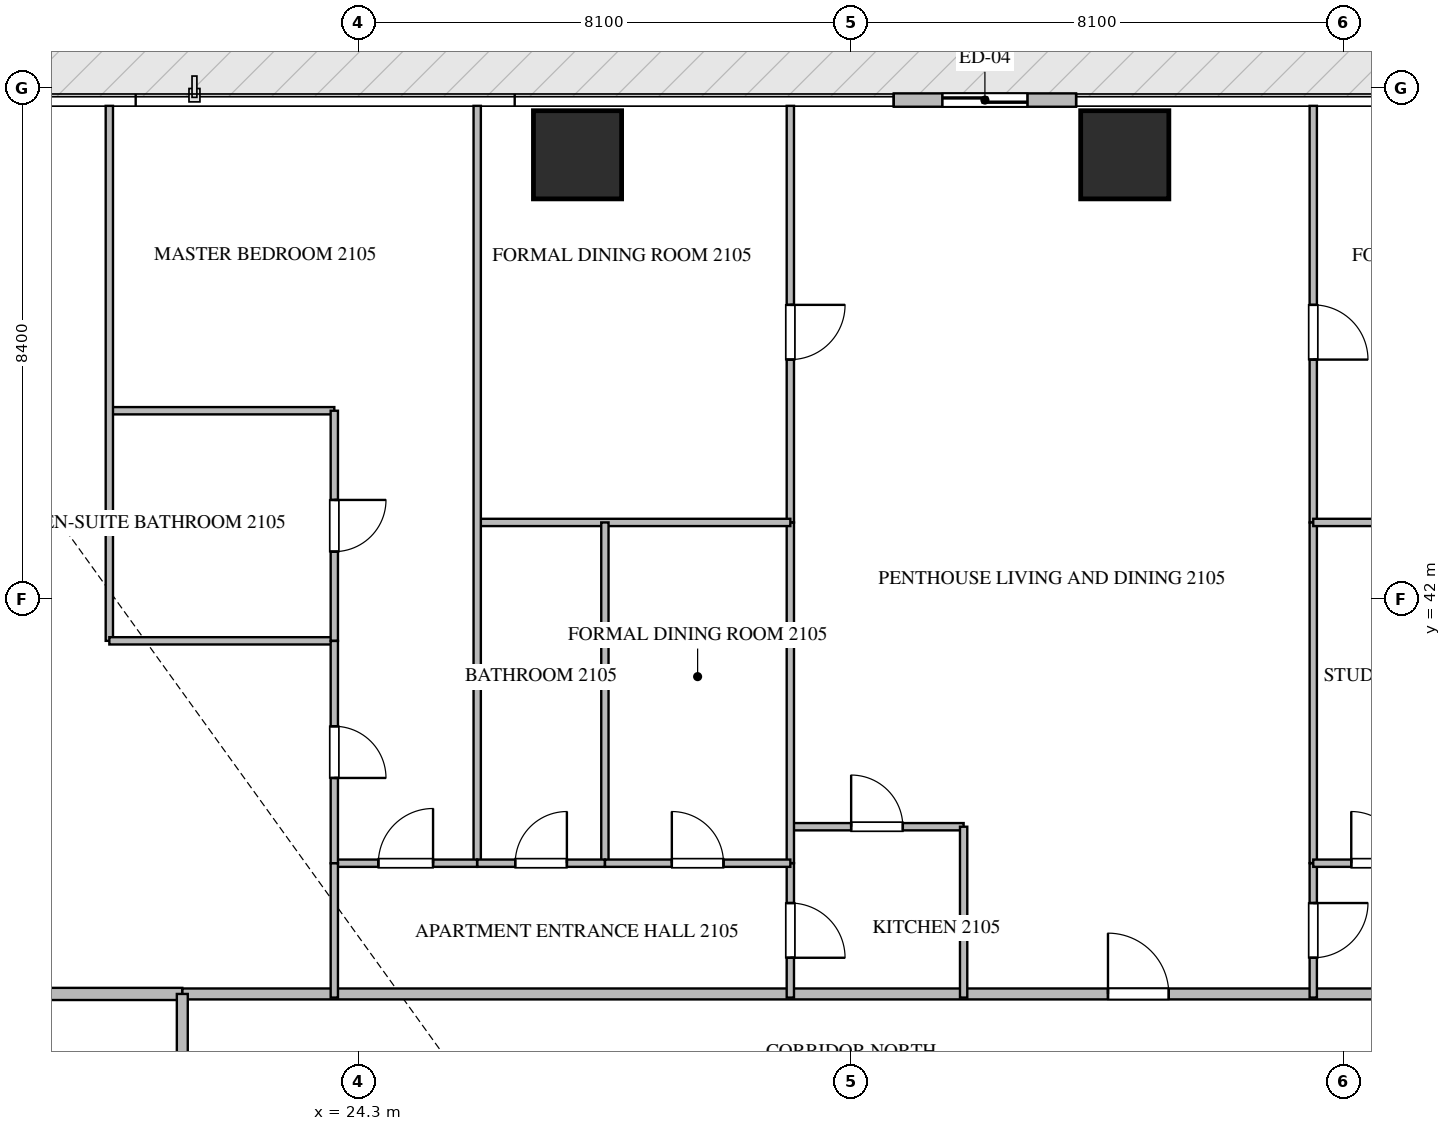
"""IFC4 building model, lengths in metres.
Left out: names, types, materials, properties, quantities, classifications, styles, units other than length and angle.
Written with IfcOpenShell. Run it as: python <this file> out.ifc"""

import sys

from ifc_helpers import new_model, si_unit, direction, frame, frame_2d, origin, origin_2d, place, context, subcontext, project, spatial, rectangle, extrude, source, transform, mapped, element, fill, save


model = new_model("IFC4")
c1 = context("Model", 3, precision=1e-05, world=origin(), true_north=direction((0.0, 1.0)))
c2 = subcontext(c1, "Body", "Model", "MODEL_VIEW")
j1 = project(units=[si_unit("LENGTHUNIT", "METRE"), si_unit("PLANEANGLEUNIT", "RADIAN")], contexts=[c1])
p1 = place(None, origin())
s1 = spatial("IfcSite", under=j1, at=p1, CompositionType="ELEMENT")
p2 = place(p1, origin())
s2 = spatial("IfcBuilding", under=s1, at=p2, CompositionType="ELEMENT")
p3 = place(p2, frame((0.0, 0.0, 86.7)))
s3 = spatial("IfcBuildingStorey", under=s2, at=p3, CompositionType="ELEMENT", Elevation=86.7)
m1 = source(origin(), c2, "Body", "SweptSolid", [
    extrude(rectangle(XDim=1.45, YDim=1.45, at=origin_2d()), origin(), (0.0, 0.0, 1.0), 3.75),
])
for number, where, z_axis, x_axis in (
    (1, (27.9, 49.3, -0.26), (0.0, 0.0, 1.0), (1.0, 0.0, 0.0)),
    (2, (36.9, 49.3, -0.26), (0.0, 0.0, 1.0), (1.0, 0.0, 0.0)),
):
    element("IfcColumn", number, at=place(p3, frame(where, z_axis=z_axis, x_axis=x_axis)), inside=s3, PredefinedType="COLUMN", context=c2, shape_type="MappedRepresentation", body=[
        mapped(m1, transform((0.0, 0.0, 0.0), scale=1.0)),
    ])
p4 = place(p3, frame((36.1, 50.2, 0.0), z_axis=(0.0, 0.0, 1.0), x_axis=(-1.0, 0.0, 0.0)))
e3 = element("IfcWall", 3, at=p4, inside=s3, PredefinedType="ELEMENTEDWALL", context=c2, shape_type="SweptSolid", body=[
    extrude(rectangle(XDim=3.0, YDim=0.22, at=frame_2d((1.5, 0.0))), origin(), (0.0, 0.0, 1.0), 3.475),
])
p5 = place(p4, frame((0.8, 0.0, 0.0)))
e4 = element("IfcOpeningElement", 4, at=p5, cuts=e3, PredefinedType="OPENING", context=c2, shape_type="SweptSolid", body=[
    extrude(rectangle(XDim=1.4, YDim=2.25, at=frame_2d((0.7, 1.125))), frame((0.0, 0.12, 0.0), z_axis=(0.0, -1.0, 0.0), x_axis=(1.0, 0.0, 0.0)), (0.0, 0.0, 1.0), 0.24),
])
p6 = place(p3, frame((6.082, 35.5, 0.0), z_axis=(0.0, 0.0, 1.0), x_axis=(1.0, 0.0, 0.0)))
e5 = element("IfcWall", 5, at=p6, inside=s3, PredefinedType="PARTITIONING", context=c2, shape_type="SweptSolid", body=[
    extrude(rectangle(XDim=15.318, YDim=0.2, at=frame_2d((7.659, 0.0))), origin(), (0.0, 0.0, 1.0), 3.49),
])
p7 = place(p3, frame((21.402, 35.5, 0.0), z_axis=(0.0, 0.0, 1.0), x_axis=(1.0, 0.0, 0.0)))
e6 = element("IfcWall", 6, at=p7, inside=s3, PredefinedType="PARTITIONING", context=c2, shape_type="SweptSolid", body=[
    extrude(rectangle(XDim=21.996, YDim=0.18, at=frame_2d((10.998, 0.0))), origin(), (0.0, 0.0, 1.0), 3.49),
])
p8 = place(p7, frame((15.222, 0.0, 0.0)))
e7 = element("IfcOpeningElement", 7, at=p8, cuts=e6, PredefinedType="OPENING", context=c2, shape_type="SweptSolid", body=[
    extrude(rectangle(XDim=1.0, YDim=2.15, at=frame_2d((0.5, 1.075))), frame((0.0, 0.1, 0.0), z_axis=(0.0, -1.0, 0.0), x_axis=(1.0, 0.0, 0.0)), (0.0, 0.0, 1.0), 0.2),
])
p9 = place(p3, frame((21.4, 14.9, 0.0), z_axis=(0.0, 0.0, 1.0), x_axis=(0.0, 1.0, 0.0)))
e8 = element("IfcWall", 8, at=p9, inside=s3, PredefinedType="PARTITIONING", context=c2, shape_type="SweptSolid", body=[
    extrude(rectangle(XDim=20.6, YDim=0.18, at=frame_2d((10.3, 0.0))), origin(), (0.0, 0.0, 1.0), 3.49),
])
p10 = place(p9, frame((5.625, 0.0, 0.0)))
e9 = element("IfcOpeningElement", 9, at=p10, cuts=e8, PredefinedType="OPENING", context=c2, shape_type="SweptSolid", body=[
    extrude(rectangle(XDim=1.0, YDim=2.15, at=frame_2d((0.5, 1.075))), frame((0.0, 0.1, 0.0), z_axis=(0.0, -1.0, 0.0), x_axis=(1.0, 0.0, 0.0)), (0.0, 0.0, 1.0), 0.2),
])
p11 = place(p9, frame((17.64, 0.0, 0.0)))
e10 = element("IfcOpeningElement", 10, at=p11, cuts=e8, PredefinedType="OPENING", context=c2, shape_type="SweptSolid", body=[
    extrude(rectangle(XDim=1.0, YDim=2.15, at=frame_2d((0.5, 1.075))), frame((0.0, 0.1, 0.0), z_axis=(0.0, -1.0, 0.0), x_axis=(1.0, 0.0, 0.0)), (0.0, 0.0, 1.0), 0.2),
])
p12 = place(p3, frame((31.4, 38.25, 0.0), z_axis=(0.0, 0.0, 1.0), x_axis=(1.0, 0.0, 0.0)))
e11 = element("IfcWall", 11, at=p12, inside=s3, PredefinedType="PARTITIONING", context=c2, shape_type="SweptSolid", body=[
    extrude(rectangle(XDim=2.85, YDim=0.12, at=frame_2d((1.425, 0.0))), origin(), (0.0, 0.0, 1.0), 3.49),
])
p13 = place(p12, frame((1.0, 0.0, 0.0)))
e12 = element("IfcOpeningElement", 12, at=p13, cuts=e11, PredefinedType="OPENING", context=c2, shape_type="SweptSolid", body=[
    extrude(rectangle(XDim=0.85, YDim=2.1, at=frame_2d((0.425, 1.05))), frame((0.0, 0.07, 0.0), z_axis=(0.0, -1.0, 0.0), x_axis=(1.0, 0.0, 0.0)), (0.0, 0.0, 1.0), 0.14),
])
p14 = place(p3, frame((34.25, 38.25, 0.0), z_axis=(0.0, 0.0, 1.0), x_axis=(0.0, -1.0, 0.0)))
e13 = element("IfcWall", 13, at=p14, inside=s3, PredefinedType="PARTITIONING", context=c2, shape_type="SweptSolid", body=[
    extrude(rectangle(XDim=2.81, YDim=0.12, at=frame_2d((1.405, 0.0))), origin(), (0.0, 0.0, 1.0), 3.49),
])
p15 = place(p3, frame((31.4, 37.65, 0.0), z_axis=(0.0, 0.0, 1.0), x_axis=(0.0, -1.0, 0.0)))
e14 = element("IfcWall", 14, at=p15, inside=s3, PredefinedType="PARTITIONING", context=c2, shape_type="SweptSolid", body=[
    extrude(rectangle(XDim=2.21, YDim=0.12, at=frame_2d((1.105, 0.0))), origin(), (0.0, 0.0, 1.0), 3.49),
])
p16 = place(p15, frame((0.655, 0.0, 0.0)))
e15 = element("IfcOpeningElement", 15, at=p16, cuts=e14, PredefinedType="OPENING", context=c2, shape_type="SweptSolid", body=[
    extrude(rectangle(XDim=0.9, YDim=2.1, at=frame_2d((0.45, 1.05))), frame((0.0, 0.07, 0.0), z_axis=(0.0, -1.0, 0.0), x_axis=(1.0, 0.0, 0.0)), (0.0, 0.0, 1.0), 0.14),
])
p17 = place(p3, frame((31.4, 50.105, 0.0), z_axis=(0.0, 0.0, 1.0), x_axis=(0.0, -1.0, 0.0)))
e16 = element("IfcWall", 16, at=p17, inside=s3, PredefinedType="PARTITIONING", context=c2, shape_type="SweptSolid", body=[
    extrude(rectangle(XDim=6.851, YDim=0.12, at=frame_2d((3.426, 0.0))), origin(), (0.0, 0.0, 1.0), 3.49),
])
p18 = place(p17, frame((3.273, 0.0, 0.0)))
e17 = element("IfcOpeningElement", 17, at=p18, cuts=e16, PredefinedType="OPENING", context=c2, shape_type="SweptSolid", body=[
    extrude(rectangle(XDim=0.9, YDim=2.1, at=frame_2d((0.45, 1.05))), frame((0.0, 0.07, 0.0), z_axis=(0.0, -1.0, 0.0), x_axis=(1.0, 0.0, 0.0)), (0.0, 0.0, 1.0), 0.14),
])
p19 = place(p3, frame((31.4, 43.252, 0.0), z_axis=(0.0, 0.0, 1.0), x_axis=(0.0, -1.0, 0.0)))
e18 = element("IfcWall", 18, at=p19, inside=s3, PredefinedType="PARTITIONING", context=c2, shape_type="SweptSolid", body=[
    extrude(rectangle(XDim=5.6, YDim=0.12, at=frame_2d((2.8, 0.0))), origin(), (0.0, 0.0, 1.0), 3.49),
])
p20 = place(p3, frame((26.25, 43.254, 0.0), z_axis=(0.0, 0.0, 1.0), x_axis=(1.0, 0.0, 0.0)))
e19 = element("IfcWall", 19, at=p20, inside=s3, PredefinedType="PARTITIONING", context=c2, shape_type="SweptSolid", body=[
    extrude(rectangle(XDim=5.15, YDim=0.12, at=frame_2d((2.575, 0.0))), origin(), (0.0, 0.0, 1.0), 3.49),
])
p21 = place(p3, frame((26.25, 50.105, 0.0), z_axis=(0.0, 0.0, 1.0), x_axis=(0.0, -1.0, 0.0)))
e20 = element("IfcWall", 20, at=p21, inside=s3, PredefinedType="PARTITIONING", context=c2, shape_type="SweptSolid", body=[
    extrude(rectangle(XDim=12.455, YDim=0.12, at=frame_2d((6.228, 0.0))), origin(), (0.0, 0.0, 1.0), 3.49),
])
p22 = place(p3, frame((28.35, 43.254, 0.0), z_axis=(0.0, 0.0, 1.0), x_axis=(0.0, -1.0, 0.0)))
e21 = element("IfcWall", 21, at=p22, inside=s3, PredefinedType="PARTITIONING", context=c2, shape_type="SweptSolid", body=[
    extrude(rectangle(XDim=5.604, YDim=0.12, at=frame_2d((2.802, 0.0))), origin(), (0.0, 0.0, 1.0), 3.49),
])
p23 = place(p3, frame((26.25, 37.65, 0.0), z_axis=(0.0, 0.0, 1.0), x_axis=(1.0, 0.0, 0.0)))
e22 = element("IfcWall", 22, at=p23, inside=s3, PredefinedType="PARTITIONING", context=c2, shape_type="SweptSolid", body=[
    extrude(rectangle(XDim=2.1, YDim=0.12, at=frame_2d((1.05, 0.0))), origin(), (0.0, 0.0, 1.0), 3.49),
])
p24 = place(p23, frame((0.625, 0.0, 0.0)))
e23 = element("IfcOpeningElement", 23, at=p24, cuts=e22, PredefinedType="OPENING", context=c2, shape_type="SweptSolid", body=[
    extrude(rectangle(XDim=0.85, YDim=2.1, at=frame_2d((0.425, 1.05))), frame((0.0, 0.07, 0.0), z_axis=(0.0, -1.0, 0.0), x_axis=(1.0, 0.0, 0.0)), (0.0, 0.0, 1.0), 0.14),
])
p25 = place(p3, frame((28.352, 37.65, 0.0), z_axis=(0.0, 0.0, 1.0), x_axis=(1.0, 0.0, 0.0)))
e24 = element("IfcWall", 24, at=p25, inside=s3, PredefinedType="PARTITIONING", context=c2, shape_type="SweptSolid", body=[
    extrude(rectangle(XDim=3.048, YDim=0.12, at=frame_2d((1.524, 0.0))), origin(), (0.0, 0.0, 1.0), 3.49),
])
p26 = place(p25, frame((1.099, 0.0, 0.0)))
e25 = element("IfcOpeningElement", 25, at=p26, cuts=e24, PredefinedType="OPENING", context=c2, shape_type="SweptSolid", body=[
    extrude(rectangle(XDim=0.85, YDim=2.1, at=frame_2d((0.425, 1.05))), frame((0.0, 0.07, 0.0), z_axis=(0.0, -1.0, 0.0), x_axis=(1.0, 0.0, 0.0)), (0.0, 0.0, 1.0), 0.14),
])
p27 = place(p3, frame((23.9, 37.65, 0.0), z_axis=(0.0, 0.0, 1.0), x_axis=(1.0, 0.0, 0.0)))
e26 = element("IfcWall", 26, at=p27, inside=s3, PredefinedType="PARTITIONING", context=c2, shape_type="SweptSolid", body=[
    extrude(rectangle(XDim=2.348, YDim=0.12, at=frame_2d((1.174, 0.0))), origin(), (0.0, 0.0, 1.0), 3.49),
])
p28 = place(p27, frame((0.724, 0.0, 0.0)))
e27 = element("IfcOpeningElement", 27, at=p28, cuts=e26, PredefinedType="OPENING", context=c2, shape_type="SweptSolid", body=[
    extrude(rectangle(XDim=0.9, YDim=2.1, at=frame_2d((0.45, 1.05))), frame((0.0, 0.07, 0.0), z_axis=(0.0, -1.0, 0.0), x_axis=(1.0, 0.0, 0.0)), (0.0, 0.0, 1.0), 0.14),
])
p29 = place(p3, frame((20.2, 45.091, 0.0), z_axis=(0.0, 0.0, 1.0), x_axis=(1.0, 0.0, 0.0)))
e28 = element("IfcWall", 28, at=p29, inside=s3, PredefinedType="PARTITIONING", context=c2, shape_type="SweptSolid", body=[
    extrude(rectangle(XDim=3.7, YDim=0.12, at=frame_2d((1.85, 0.0))), origin(), (0.0, 0.0, 1.0), 3.49),
])
p30 = place(p3, frame((20.2, 50.105, 0.0), z_axis=(0.0, 0.0, 1.0), x_axis=(0.0, -1.0, 0.0)))
e29 = element("IfcWall", 29, at=p30, inside=s3, PredefinedType="PARTITIONING", context=c2, shape_type="SweptSolid", body=[
    extrude(rectangle(XDim=8.798, YDim=0.12, at=frame_2d((4.399, 0.0))), origin(), (0.0, 0.0, 1.0), 3.49),
])
p31 = place(p3, frame((20.2, 41.307, 0.0), z_axis=(0.0, 0.0, 1.0), x_axis=(1.0, 0.0, 0.0)))
e30 = element("IfcWall", 30, at=p31, inside=s3, PredefinedType="PARTITIONING", context=c2, shape_type="SweptSolid", body=[
    extrude(rectangle(XDim=3.7, YDim=0.12, at=frame_2d((1.85, 0.0))), origin(), (0.0, 0.0, 1.0), 3.49),
])
p32 = place(p3, frame((23.9, 45.091, 0.0), z_axis=(0.0, 0.0, 1.0), x_axis=(0.0, -1.0, 0.0)))
e31 = element("IfcWall", 31, at=p32, inside=s3, PredefinedType="PARTITIONING", context=c2, shape_type="SweptSolid", body=[
    extrude(rectangle(XDim=3.784, YDim=0.12, at=frame_2d((1.892, 0.0))), origin(), (0.0, 0.0, 1.0), 3.49),
])
p33 = place(p32, frame((1.467, 0.0, 0.0)))
e32 = element("IfcOpeningElement", 32, at=p33, cuts=e31, PredefinedType="OPENING", context=c2, shape_type="SweptSolid", body=[
    extrude(rectangle(XDim=0.85, YDim=2.1, at=frame_2d((0.425, 1.05))), frame((0.0, 0.07, 0.0), z_axis=(0.0, -1.0, 0.0), x_axis=(1.0, 0.0, 0.0)), (0.0, 0.0, 1.0), 0.14),
])
p34 = place(p3, frame((23.9, 41.305, 0.0), z_axis=(0.0, 0.0, 1.0), x_axis=(0.0, -1.0, 0.0)))
e33 = element("IfcWall", 33, at=p34, inside=s3, PredefinedType="PARTITIONING", context=c2, shape_type="SweptSolid", body=[
    extrude(rectangle(XDim=3.655, YDim=0.12, at=frame_2d((1.828, 0.0))), origin(), (0.0, 0.0, 1.0), 3.49),
])
p35 = place(p34, frame((1.403, 0.0, 0.0)))
e34 = element("IfcOpeningElement", 34, at=p35, cuts=e33, PredefinedType="OPENING", context=c2, shape_type="SweptSolid", body=[
    extrude(rectangle(XDim=0.85, YDim=2.1, at=frame_2d((0.425, 1.05))), frame((0.0, 0.07, 0.0), z_axis=(0.0, -1.0, 0.0), x_axis=(1.0, 0.0, 0.0)), (0.0, 0.0, 1.0), 0.14),
])
p36 = place(p3, frame((23.9, 37.648, 0.0), z_axis=(0.0, 0.0, 1.0), x_axis=(0.0, -1.0, 0.0)))
e35 = element("IfcWall", 35, at=p36, inside=s3, PredefinedType="PARTITIONING", context=c2, shape_type="SweptSolid", body=[
    extrude(rectangle(XDim=2.208, YDim=0.12, at=frame_2d((1.104, 0.0))), origin(), (0.0, 0.0, 1.0), 3.49),
])
p37 = place(p3, frame((40.0, 37.65, 0.0), z_axis=(0.0, 0.0, 1.0), x_axis=(0.0, -1.0, 0.0)))
e36 = element("IfcWall", 36, at=p37, inside=s3, PredefinedType="PARTITIONING", context=c2, shape_type="SweptSolid", body=[
    extrude(rectangle(XDim=2.21, YDim=0.12, at=frame_2d((1.105, 0.0))), origin(), (0.0, 0.0, 1.0), 3.49),
])
p38 = place(p37, frame((0.655, 0.0, 0.0)))
e37 = element("IfcOpeningElement", 37, at=p38, cuts=e36, PredefinedType="OPENING", context=c2, shape_type="SweptSolid", body=[
    extrude(rectangle(XDim=0.9, YDim=2.1, at=frame_2d((0.45, 1.05))), frame((0.0, 0.07, 0.0), z_axis=(0.0, -1.0, 0.0), x_axis=(1.0, 0.0, 0.0)), (0.0, 0.0, 1.0), 0.14),
])
p39 = place(p3, frame((40.0, 50.105, 0.0), z_axis=(0.0, 0.0, 1.0), x_axis=(0.0, -1.0, 0.0)))
e38 = element("IfcWall", 38, at=p39, inside=s3, PredefinedType="PARTITIONING", context=c2, shape_type="SweptSolid", body=[
    extrude(rectangle(XDim=6.851, YDim=0.12, at=frame_2d((3.426, 0.0))), origin(), (0.0, 0.0, 1.0), 3.49),
])
p40 = place(p39, frame((3.273, 0.0, 0.0)))
e39 = element("IfcOpeningElement", 39, at=p40, cuts=e38, PredefinedType="OPENING", context=c2, shape_type="SweptSolid", body=[
    extrude(rectangle(XDim=0.9, YDim=2.1, at=frame_2d((0.45, 1.05))), frame((0.0, 0.07, 0.0), z_axis=(0.0, -1.0, 0.0), x_axis=(1.0, 0.0, 0.0)), (0.0, 0.0, 1.0), 0.14),
])
p41 = place(p3, frame((40.0, 43.252, 0.0), z_axis=(0.0, 0.0, 1.0), x_axis=(0.0, -1.0, 0.0)))
e40 = element("IfcWall", 40, at=p41, inside=s3, PredefinedType="PARTITIONING", context=c2, shape_type="SweptSolid", body=[
    extrude(rectangle(XDim=5.6, YDim=0.12, at=frame_2d((2.8, 0.0))), origin(), (0.0, 0.0, 1.0), 3.49),
])
p42 = place(p3, frame((40.0, 43.254, 0.0), z_axis=(0.0, 0.0, 1.0), x_axis=(1.0, 0.0, 0.0)))
e41 = element("IfcWall", 41, at=p42, inside=s3, PredefinedType="PARTITIONING", context=c2, shape_type="SweptSolid", body=[
    extrude(rectangle(XDim=5.15, YDim=0.12, at=frame_2d((2.575, 0.0))), origin(), (0.0, 0.0, 1.0), 3.49),
])
p43 = place(p3, frame((40.0, 37.65, 0.0), z_axis=(0.0, 0.0, 1.0), x_axis=(1.0, 0.0, 0.0)))
e42 = element("IfcWall", 42, at=p43, inside=s3, PredefinedType="PARTITIONING", context=c2, shape_type="SweptSolid", body=[
    extrude(rectangle(XDim=2.1, YDim=0.12, at=frame_2d((1.05, 0.0))), origin(), (0.0, 0.0, 1.0), 3.49),
])
p44 = place(p43, frame((0.625, 0.0, 0.0)))
e43 = element("IfcOpeningElement", 43, at=p44, cuts=e42, PredefinedType="OPENING", context=c2, shape_type="SweptSolid", body=[
    extrude(rectangle(XDim=0.85, YDim=2.1, at=frame_2d((0.425, 1.05))), frame((0.0, 0.07, 0.0), z_axis=(0.0, -1.0, 0.0), x_axis=(1.0, 0.0, 0.0)), (0.0, 0.0, 1.0), 0.14),
])
m2 = source(origin(), c2, "Body", "SweptSolid", [
    extrude(rectangle(XDim=1.4, YDim=2.25, at=frame_2d((0.7, 1.125))), frame((0.0, 0.025, 0.0), z_axis=(0.0, -1.0, 0.0), x_axis=(1.0, 0.0, 0.0)), (0.0, 0.0, 1.0), 0.05),
])
p45 = place(p5, origin())
e44 = element("IfcDoor", 44, at=p45, inside=s3, OperationType="SLIDING_TO_LEFT", PredefinedType="DOOR", context=c2, shape_type="MappedRepresentation", body=[
    mapped(m2, transform((0.0, 0.0, 0.0), scale=1.0)),
])
fill(e4, e44)
m3 = source(origin(), c2, "Body", "SweptSolid", [
    extrude(rectangle(XDim=1.0, YDim=2.15, at=frame_2d((0.5, 1.075))), frame((0.0, 0.025, 0.0), z_axis=(0.0, -1.0, 0.0), x_axis=(1.0, 0.0, 0.0)), (0.0, 0.0, 1.0), 0.05),
])
p46 = place(p8, origin())
e45 = element("IfcDoor", 45, at=p46, inside=s3, OperationType="SINGLE_SWING_LEFT", PredefinedType="DOOR", context=c2, shape_type="MappedRepresentation", body=[
    mapped(m3, transform((0.0, 0.0, 0.0), scale=1.0)),
])
fill(e7, e45)
m4 = source(origin(), c2, "Body", "SweptSolid", [
    extrude(rectangle(XDim=0.85, YDim=2.1, at=frame_2d((0.425, 1.05))), frame((0.0, 0.025, 0.0), z_axis=(0.0, -1.0, 0.0), x_axis=(1.0, 0.0, 0.0)), (0.0, 0.0, 1.0), 0.05),
])
p47 = place(p13, origin())
e46 = element("IfcDoor", 46, at=p47, inside=s3, OperationType="SINGLE_SWING_LEFT", PredefinedType="DOOR", context=c2, shape_type="MappedRepresentation", body=[
    mapped(m4, transform((0.0, 0.0, 0.0), scale=1.0)),
])
fill(e12, e46)
m5 = source(origin(), c2, "Body", "SweptSolid", [
    extrude(rectangle(XDim=0.9, YDim=2.1, at=frame_2d((0.45, 1.05))), frame((0.0, 0.025, 0.0), z_axis=(0.0, -1.0, 0.0), x_axis=(1.0, 0.0, 0.0)), (0.0, 0.0, 1.0), 0.05),
])
p48 = place(p16, origin())
e47 = element("IfcDoor", 47, at=p48, inside=s3, OperationType="SINGLE_SWING_RIGHT", PredefinedType="DOOR", context=c2, shape_type="MappedRepresentation", body=[
    mapped(m5, transform((0.0, 0.0, 0.0), scale=1.0)),
])
fill(e15, e47)
p49 = place(p18, origin())
e48 = element("IfcDoor", 48, at=p49, inside=s3, OperationType="SINGLE_SWING_LEFT", PredefinedType="DOOR", context=c2, shape_type="MappedRepresentation", body=[
    mapped(m5, transform((0.0, 0.0, 0.0), scale=1.0)),
])
fill(e17, e48)
p50 = place(p24, origin())
e49 = element("IfcDoor", 49, at=p50, inside=s3, OperationType="SINGLE_SWING_RIGHT", PredefinedType="DOOR", context=c2, shape_type="MappedRepresentation", body=[
    mapped(m4, transform((0.0, 0.0, 0.0), scale=1.0)),
])
fill(e23, e49)
p51 = place(p26, origin())
e50 = element("IfcDoor", 50, at=p51, inside=s3, OperationType="SINGLE_SWING_LEFT", PredefinedType="DOOR", context=c2, shape_type="MappedRepresentation", body=[
    mapped(m4, transform((0.0, 0.0, 0.0), scale=1.0)),
])
fill(e25, e50)
p52 = place(p28, origin())
e51 = element("IfcDoor", 51, at=p52, inside=s3, OperationType="SINGLE_SWING_RIGHT", PredefinedType="DOOR", context=c2, shape_type="MappedRepresentation", body=[
    mapped(m5, transform((0.0, 0.0, 0.0), scale=1.0)),
])
fill(e27, e51)
p53 = place(p33, origin())
e52 = element("IfcDoor", 52, at=p53, inside=s3, OperationType="SINGLE_SWING_LEFT", PredefinedType="DOOR", context=c2, shape_type="MappedRepresentation", body=[
    mapped(m4, transform((0.0, 0.0, 0.0), scale=1.0)),
])
fill(e32, e52)
p54 = place(p35, origin())
e53 = element("IfcDoor", 53, at=p54, inside=s3, OperationType="SINGLE_SWING_RIGHT", PredefinedType="DOOR", context=c2, shape_type="MappedRepresentation", body=[
    mapped(m4, transform((0.0, 0.0, 0.0), scale=1.0)),
])
fill(e34, e53)
p55 = place(p38, origin())
e54 = element("IfcDoor", 54, at=p55, inside=s3, OperationType="SINGLE_SWING_LEFT", PredefinedType="DOOR", context=c2, shape_type="MappedRepresentation", body=[
    mapped(m5, transform((0.0, 0.0, 0.0), scale=1.0)),
])
fill(e37, e54)
p56 = place(p40, origin())
e55 = element("IfcDoor", 55, at=p56, inside=s3, OperationType="SINGLE_SWING_RIGHT", PredefinedType="DOOR", context=c2, shape_type="MappedRepresentation", body=[
    mapped(m5, transform((0.0, 0.0, 0.0), scale=1.0)),
])
fill(e39, e55)
p57 = place(p44, origin())
e56 = element("IfcDoor", 56, at=p57, inside=s3, OperationType="SINGLE_SWING_LEFT", PredefinedType="DOOR", context=c2, shape_type="MappedRepresentation", body=[
    mapped(m4, transform((0.0, 0.0, 0.0), scale=1.0)),
])
fill(e43, e56)
save(model, sys.argv[1])
